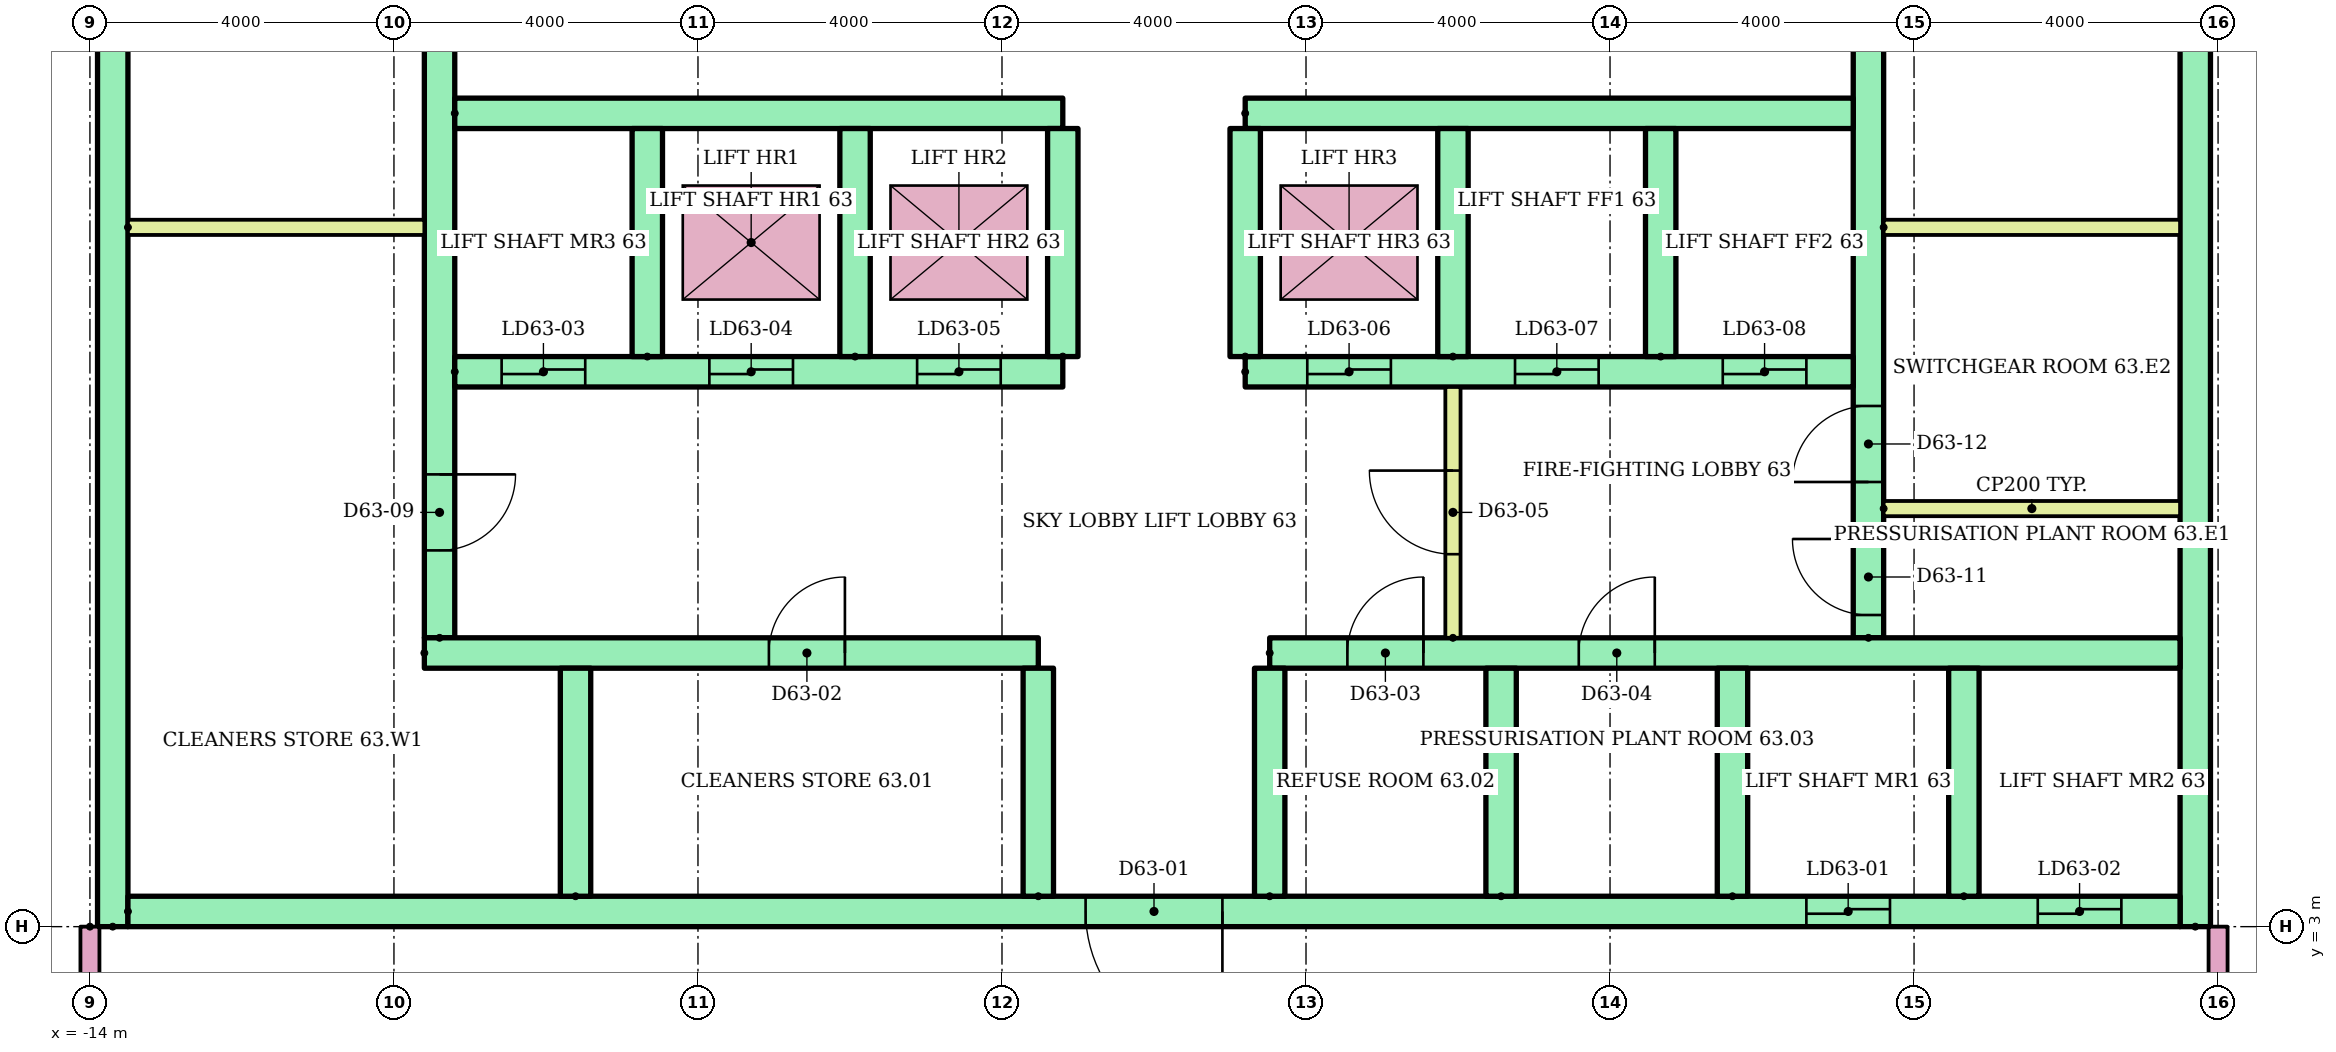
"""IFC4 building model, lengths in metres.
Left out: names, types, materials, properties, quantities, classifications, styles, units other than length and angle.
Written with IfcOpenShell. Run it as: python <this file> out.ifc"""

import sys

from ifc_helpers import new_model, si_unit, direction, frame, frame_2d, origin, place, context, subcontext, project, spatial, rectangle, extrude, element, fill, save


model = new_model("IFC4")
c1 = context("Model", 3, precision=1e-05, world=origin(), true_north=direction((0.0, 1.0)))
c2 = subcontext(c1, "Body", "Model", "MODEL_VIEW")
j1 = project(units=[si_unit("LENGTHUNIT", "METRE"), si_unit("PLANEANGLEUNIT", "RADIAN")], contexts=[c1])
p1 = place(None, origin())
s1 = spatial("IfcSite", under=j1, at=p1, CompositionType="ELEMENT")
p2 = place(p1, origin())
s2 = spatial("IfcBuilding", under=s1, at=p2, CompositionType="ELEMENT")
p3 = place(p2, frame((0.0, 0.0, 239.6)))
s3 = spatial("IfcBuildingStorey", under=s2, at=p3, CompositionType="ELEMENT", Elevation=239.6)
for number, where, z_axis, x_axis in (
    (1, (-13.7, 3.0, 0.0), (0.0, 0.0, 1.0), (0.0, 1.0, 0.0)),
    (2, (13.7, 3.0, 0.0), (0.0, 0.0, 1.0), (0.0, 1.0, 0.0)),
):
    element("IfcWall", number, at=place(p3, frame(where, z_axis=z_axis, x_axis=x_axis)), inside=s3, PredefinedType="SHEAR", context=c2, shape_type="SweptSolid", body=[
        extrude(rectangle(XDim=17.0, YDim=0.4, at=frame_2d((8.5, 0.0))), origin(), (0.0, 0.0, 1.0), 8.8),
    ])
p4 = place(p3, frame((-9.4, 6.8, 0.0), z_axis=(0.0, 0.0, 1.0), x_axis=(0.0, 1.0, 0.0)))
e3 = element("IfcWall", 3, at=p4, inside=s3, PredefinedType="SHEAR", context=c2, shape_type="SweptSolid", body=[
    extrude(rectangle(XDim=12.7, YDim=0.4, at=frame_2d((6.35, 0.0))), origin(), (0.0, 0.0, 1.0), 8.8),
])
p5 = place(p4, frame((1.15, 0.0, 0.0)))
e4 = element("IfcOpeningElement", 4, at=p5, cuts=e3, PredefinedType="OPENING", context=c2, shape_type="SweptSolid", body=[
    extrude(rectangle(XDim=1.0, YDim=2.1, at=frame_2d((0.5, 1.05))), frame((0.0, 0.21, 0.0), z_axis=(0.0, -1.0, 0.0), x_axis=(1.0, 0.0, 0.0)), (0.0, 0.0, 1.0), 0.42),
])
p6 = place(p4, frame((7.925, 0.0, 0.0)))
e5 = element("IfcOpeningElement", 5, at=p6, cuts=e3, PredefinedType="OPENING", context=c2, shape_type="SweptSolid", body=[
    extrude(rectangle(XDim=1.0, YDim=2.1, at=frame_2d((0.5, 1.05))), frame((0.0, 0.21, 0.0), z_axis=(0.0, -1.0, 0.0), x_axis=(1.0, 0.0, 0.0)), (0.0, 0.0, 1.0), 0.42),
])
p7 = place(p3, frame((9.4, 6.8, 0.0), z_axis=(0.0, 0.0, 1.0), x_axis=(0.0, 1.0, 0.0)))
e6 = element("IfcWall", 6, at=p7, inside=s3, PredefinedType="SHEAR", context=c2, shape_type="SweptSolid", body=[
    extrude(rectangle(XDim=12.7, YDim=0.4, at=frame_2d((6.35, 0.0))), origin(), (0.0, 0.0, 1.0), 8.8),
])
p8 = place(p7, frame((0.3, 0.0, 0.0)))
e7 = element("IfcOpeningElement", 7, at=p8, cuts=e6, PredefinedType="OPENING", context=c2, shape_type="SweptSolid", body=[
    extrude(rectangle(XDim=1.0, YDim=2.1, at=frame_2d((0.5, 1.05))), frame((0.0, 0.21, 0.0), z_axis=(0.0, -1.0, 0.0), x_axis=(1.0, 0.0, 0.0)), (0.0, 0.0, 1.0), 0.42),
])
p9 = place(p7, frame((2.05, 0.0, 0.0)))
e8 = element("IfcOpeningElement", 8, at=p9, cuts=e6, PredefinedType="OPENING", context=c2, shape_type="SweptSolid", body=[
    extrude(rectangle(XDim=1.0, YDim=2.1, at=frame_2d((0.5, 1.05))), frame((0.0, 0.21, 0.0), z_axis=(0.0, -1.0, 0.0), x_axis=(1.0, 0.0, 0.0)), (0.0, 0.0, 1.0), 0.42),
])
p10 = place(p7, frame((7.925, 0.0, 0.0)))
e9 = element("IfcOpeningElement", 9, at=p10, cuts=e6, PredefinedType="OPENING", context=c2, shape_type="SweptSolid", body=[
    extrude(rectangle(XDim=1.0, YDim=2.1, at=frame_2d((0.5, 1.05))), frame((0.0, 0.21, 0.0), z_axis=(0.0, -1.0, 0.0), x_axis=(1.0, 0.0, 0.0)), (0.0, 0.0, 1.0), 0.42),
])
p11 = place(p3, frame((-13.5, 3.2, 0.0)))
e10 = element("IfcWall", 10, at=p11, inside=s3, PredefinedType="SHEAR", context=c2, shape_type="SweptSolid", body=[
    extrude(rectangle(XDim=27.0, YDim=0.4, at=frame_2d((13.5, 0.0))), origin(), (0.0, 0.0, 1.0), 8.8),
])
p12 = place(p11, frame((22.083, 0.0, 0.0)))
e11 = element("IfcOpeningElement", 11, at=p12, cuts=e10, PredefinedType="OPENING", context=c2, shape_type="SweptSolid", body=[
    extrude(rectangle(XDim=1.1, YDim=2.1, at=frame_2d((0.55, 1.05))), frame((0.0, 0.21, 0.0), z_axis=(0.0, -1.0, 0.0), x_axis=(1.0, 0.0, 0.0)), (0.0, 0.0, 1.0), 0.42),
])
p13 = place(p11, frame((25.128, 0.0, 0.0)))
e12 = element("IfcOpeningElement", 12, at=p13, cuts=e10, PredefinedType="OPENING", context=c2, shape_type="SweptSolid", body=[
    extrude(rectangle(XDim=1.1, YDim=2.1, at=frame_2d((0.55, 1.05))), frame((0.0, 0.21, 0.0), z_axis=(0.0, -1.0, 0.0), x_axis=(1.0, 0.0, 0.0)), (0.0, 0.0, 1.0), 0.42),
])
p14 = place(p11, frame((12.6, 0.0, 0.0)))
e13 = element("IfcOpeningElement", 13, at=p14, cuts=e10, PredefinedType="OPENING", context=c2, shape_type="SweptSolid", body=[
    extrude(rectangle(XDim=1.8, YDim=2.1, at=frame_2d((0.9, 1.05))), frame((0.0, 0.21, 0.0), z_axis=(0.0, -1.0, 0.0), x_axis=(1.0, 0.0, 0.0)), (0.0, 0.0, 1.0), 0.42),
])
p15 = place(p3, frame((-9.6, 6.6, 0.0)))
e14 = element("IfcWall", 14, at=p15, inside=s3, PredefinedType="SHEAR", context=c2, shape_type="SweptSolid", body=[
    extrude(rectangle(XDim=8.078, YDim=0.4, at=frame_2d((4.039, 0.0))), origin(), (0.0, 0.0, 1.0), 8.8),
])
p16 = place(p15, frame((4.533, 0.0, 0.0)))
e15 = element("IfcOpeningElement", 15, at=p16, cuts=e14, PredefinedType="OPENING", context=c2, shape_type="SweptSolid", body=[
    extrude(rectangle(XDim=1.0, YDim=2.1, at=frame_2d((0.5, 1.05))), frame((0.0, 0.21, 0.0), z_axis=(0.0, -1.0, 0.0), x_axis=(1.0, 0.0, 0.0)), (0.0, 0.0, 1.0), 0.42),
])
p17 = place(p3, frame((1.522, 6.6, 0.0)))
e16 = element("IfcWall", 16, at=p17, inside=s3, PredefinedType="SHEAR", context=c2, shape_type="SweptSolid", body=[
    extrude(rectangle(XDim=11.978, YDim=0.4, at=frame_2d((5.989, 0.0))), origin(), (0.0, 0.0, 1.0), 8.8),
])
p18 = place(p17, frame((1.022, 0.0, 0.0)))
e17 = element("IfcOpeningElement", 17, at=p18, cuts=e16, PredefinedType="OPENING", context=c2, shape_type="SweptSolid", body=[
    extrude(rectangle(XDim=1.0, YDim=2.1, at=frame_2d((0.5, 1.05))), frame((0.0, 0.21, 0.0), z_axis=(0.0, -1.0, 0.0), x_axis=(1.0, 0.0, 0.0)), (0.0, 0.0, 1.0), 0.42),
])
p19 = place(p17, frame((4.067, 0.0, 0.0)))
e18 = element("IfcOpeningElement", 18, at=p19, cuts=e16, PredefinedType="OPENING", context=c2, shape_type="SweptSolid", body=[
    extrude(rectangle(XDim=1.0, YDim=2.1, at=frame_2d((0.5, 1.05))), frame((0.0, 0.21, 0.0), z_axis=(0.0, -1.0, 0.0), x_axis=(1.0, 0.0, 0.0)), (0.0, 0.0, 1.0), 0.42),
])
for number, where, z_axis, x_axis in (
    (19, (-7.611, 3.4, 0.0), (0.0, 0.0, 1.0), (0.0, 1.0, 0.0)),
    (20, (-1.522, 3.4, 0.0), (0.0, 0.0, 1.0), (0.0, 1.0, 0.0)),
    (21, (1.522, 3.4, 0.0), (0.0, 0.0, 1.0), (0.0, 1.0, 0.0)),
    (22, (4.567, 3.4, 0.0), (0.0, 0.0, 1.0), (0.0, 1.0, 0.0)),
    (23, (7.611, 3.4, 0.0), (0.0, 0.0, 1.0), (0.0, 1.0, 0.0)),
    (24, (10.656, 3.4, 0.0), (0.0, 0.0, 1.0), (0.0, 1.0, 0.0)),
):
    element("IfcWall", number, at=place(p3, frame(where, z_axis=z_axis, x_axis=x_axis)), inside=s3, PredefinedType="SHEAR", context=c2, shape_type="SweptSolid", body=[
        extrude(rectangle(XDim=3.0, YDim=0.4, at=frame_2d((1.5, 0.0))), origin(), (0.0, 0.0, 1.0), 8.8),
    ])
p20 = place(p3, frame((-9.2, 10.3, 0.0)))
e25 = element("IfcWall", 25, at=p20, inside=s3, PredefinedType="SHEAR", context=c2, shape_type="SweptSolid", body=[
    extrude(rectangle(XDim=8.0, YDim=0.4, at=frame_2d((4.0, 0.0))), origin(), (0.0, 0.0, 1.0), 8.8),
])
p21 = place(p20, frame((0.617, 0.0, 0.0)))
e26 = element("IfcOpeningElement", 26, at=p21, cuts=e25, PredefinedType="OPENING", context=c2, shape_type="SweptSolid", body=[
    extrude(rectangle(XDim=1.1, YDim=2.1, at=frame_2d((0.55, 1.05))), frame((0.0, 0.21, 0.0), z_axis=(0.0, -1.0, 0.0), x_axis=(1.0, 0.0, 0.0)), (0.0, 0.0, 1.0), 0.42),
])
p22 = place(p20, frame((3.35, 0.0, 0.0)))
e27 = element("IfcOpeningElement", 27, at=p22, cuts=e25, PredefinedType="OPENING", context=c2, shape_type="SweptSolid", body=[
    extrude(rectangle(XDim=1.1, YDim=2.1, at=frame_2d((0.55, 1.05))), frame((0.0, 0.21, 0.0), z_axis=(0.0, -1.0, 0.0), x_axis=(1.0, 0.0, 0.0)), (0.0, 0.0, 1.0), 0.42),
])
p23 = place(p20, frame((6.083, 0.0, 0.0)))
e28 = element("IfcOpeningElement", 28, at=p23, cuts=e25, PredefinedType="OPENING", context=c2, shape_type="SweptSolid", body=[
    extrude(rectangle(XDim=1.1, YDim=2.1, at=frame_2d((0.55, 1.05))), frame((0.0, 0.21, 0.0), z_axis=(0.0, -1.0, 0.0), x_axis=(1.0, 0.0, 0.0)), (0.0, 0.0, 1.0), 0.42),
])
p24 = place(p3, frame((-9.2, 13.7, 0.0)))
e29 = element("IfcWall", 29, at=p24, inside=s3, PredefinedType="SHEAR", context=c2, shape_type="SweptSolid", body=[
    extrude(rectangle(XDim=8.0, YDim=0.4, at=frame_2d((4.0, 0.0))), origin(), (0.0, 0.0, 1.0), 8.8),
])
p25 = place(p3, frame((1.2, 10.3, 0.0)))
e30 = element("IfcWall", 30, at=p25, inside=s3, PredefinedType="SHEAR", context=c2, shape_type="SweptSolid", body=[
    extrude(rectangle(XDim=8.0, YDim=0.4, at=frame_2d((4.0, 0.0))), origin(), (0.0, 0.0, 1.0), 8.8),
])
p26 = place(p25, frame((0.817, 0.0, 0.0)))
e31 = element("IfcOpeningElement", 31, at=p26, cuts=e30, PredefinedType="OPENING", context=c2, shape_type="SweptSolid", body=[
    extrude(rectangle(XDim=1.1, YDim=2.1, at=frame_2d((0.55, 1.05))), frame((0.0, 0.21, 0.0), z_axis=(0.0, -1.0, 0.0), x_axis=(1.0, 0.0, 0.0)), (0.0, 0.0, 1.0), 0.42),
])
p27 = place(p25, frame((3.55, 0.0, 0.0)))
e32 = element("IfcOpeningElement", 32, at=p27, cuts=e30, PredefinedType="OPENING", context=c2, shape_type="SweptSolid", body=[
    extrude(rectangle(XDim=1.1, YDim=2.1, at=frame_2d((0.55, 1.05))), frame((0.0, 0.21, 0.0), z_axis=(0.0, -1.0, 0.0), x_axis=(1.0, 0.0, 0.0)), (0.0, 0.0, 1.0), 0.42),
])
p28 = place(p25, frame((6.283, 0.0, 0.0)))
e33 = element("IfcOpeningElement", 33, at=p28, cuts=e30, PredefinedType="OPENING", context=c2, shape_type="SweptSolid", body=[
    extrude(rectangle(XDim=1.1, YDim=2.1, at=frame_2d((0.55, 1.05))), frame((0.0, 0.21, 0.0), z_axis=(0.0, -1.0, 0.0), x_axis=(1.0, 0.0, 0.0)), (0.0, 0.0, 1.0), 0.42),
])
p29 = place(p3, frame((1.2, 13.7, 0.0)))
e34 = element("IfcWall", 34, at=p29, inside=s3, PredefinedType="SHEAR", context=c2, shape_type="SweptSolid", body=[
    extrude(rectangle(XDim=8.0, YDim=0.4, at=frame_2d((4.0, 0.0))), origin(), (0.0, 0.0, 1.0), 8.8),
])
for number, where, z_axis, x_axis in (
    (35, (-6.667, 10.5, 0.0), (0.0, 0.0, 1.0), (0.0, 1.0, 0.0)),
    (36, (-3.933, 10.5, 0.0), (0.0, 0.0, 1.0), (0.0, 1.0, 0.0)),
    (37, (-1.2, 10.5, 0.0), (0.0, 0.0, 1.0), (0.0, 1.0, 0.0)),
    (38, (1.2, 10.5, 0.0), (0.0, 0.0, 1.0), (0.0, 1.0, 0.0)),
    (39, (3.933, 10.5, 0.0), (0.0, 0.0, 1.0), (0.0, 1.0, 0.0)),
    (40, (6.667, 10.5, 0.0), (0.0, 0.0, 1.0), (0.0, 1.0, 0.0)),
):
    element("IfcWall", number, at=place(p3, frame(where, z_axis=z_axis, x_axis=x_axis)), inside=s3, PredefinedType="SHEAR", context=c2, shape_type="SweptSolid", body=[
        extrude(rectangle(XDim=3.0, YDim=0.4, at=frame_2d((1.5, 0.0))), origin(), (0.0, 0.0, 1.0), 8.8),
    ])
p30 = place(p3, frame((3.933, 6.8, 0.0), z_axis=(0.0, 0.0, 1.0), x_axis=(0.0, 1.0, 0.0)))
e41 = element("IfcWall", 41, at=p30, inside=s3, PredefinedType="PARTITIONING", context=c2, shape_type="SweptSolid", body=[
    extrude(rectangle(XDim=3.3, YDim=0.2, at=frame_2d((1.65, 0.0))), origin(), (0.0, 0.0, 1.0), 8.8),
])
p31 = place(p30, frame((1.1, 0.0, 0.0)))
e42 = element("IfcOpeningElement", 42, at=p31, cuts=e41, PredefinedType="OPENING", context=c2, shape_type="SweptSolid", body=[
    extrude(rectangle(XDim=1.1, YDim=2.1, at=frame_2d((0.55, 1.05))), frame((0.0, 0.11, 0.0), z_axis=(0.0, -1.0, 0.0), x_axis=(1.0, 0.0, 0.0)), (0.0, 0.0, 1.0), 0.22),
])
for number, where in (
    (43, (-13.5, 12.2, 0.0)),
    (44, (9.6, 8.5, 0.0)),
    (45, (9.6, 12.2, 0.0)),
):
    element("IfcWall", number, at=place(p3, frame(where)), inside=s3, PredefinedType="PARTITIONING", context=c2, shape_type="SweptSolid", body=[
        extrude(rectangle(XDim=3.9, YDim=0.2, at=frame_2d((1.95, 0.0))), origin(), (0.0, 0.0, 1.0), 8.8),
    ])
for number, where, z_axis, x_axis in (
    (46, (-14.0, 3.0, 0.0), (0.0, 0.0, 1.0), (0.0, -1.0, 0.0)),
    (47, (14.0, 1.4, 0.0), (0.0, 0.0, 1.0), (0.0, 1.0, 0.0)),
):
    element("IfcWall", number, at=place(p3, frame(where, z_axis=z_axis, x_axis=x_axis)), inside=s3, PredefinedType="PARTITIONING", context=c2, shape_type="SweptSolid", body=[
        extrude(rectangle(XDim=1.6, YDim=0.25, at=frame_2d((0.8, 0.0))), origin(), (0.0, 0.0, 1.0), 8.8),
    ])
p32 = place(p12, origin())
e48 = element("IfcDoor", 48, at=p32, inside=s3, OperationType="SLIDING_TO_LEFT", PredefinedType="DOOR", context=c2, shape_type="SweptSolid", body=[
    extrude(rectangle(XDim=1.1, YDim=2.1, at=frame_2d((0.55, 1.05))), frame((0.0, 0.025, 0.0), z_axis=(0.0, -1.0, 0.0), x_axis=(1.0, 0.0, 0.0)), (0.0, 0.0, 1.0), 0.05),
])
fill(e11, e48)
p33 = place(p13, origin())
e49 = element("IfcDoor", 49, at=p33, inside=s3, OperationType="SLIDING_TO_LEFT", PredefinedType="DOOR", context=c2, shape_type="SweptSolid", body=[
    extrude(rectangle(XDim=1.1, YDim=2.1, at=frame_2d((0.55, 1.05))), frame((0.0, 0.025, 0.0), z_axis=(0.0, -1.0, 0.0), x_axis=(1.0, 0.0, 0.0)), (0.0, 0.0, 1.0), 0.05),
])
fill(e12, e49)
p34 = place(p14, frame((1.8, 0.0, 0.0), z_axis=(0.0, 0.0, 1.0), x_axis=(-1.0, 0.0, 0.0)))
e50 = element("IfcDoor", 50, at=p34, inside=s3, OperationType="DOUBLE_DOOR_SINGLE_SWING", PredefinedType="DOOR", context=c2, shape_type="SweptSolid", body=[
    extrude(rectangle(XDim=1.8, YDim=2.1, at=frame_2d((0.9, 1.05))), frame((0.0, 0.025, 0.0), z_axis=(0.0, -1.0, 0.0), x_axis=(1.0, 0.0, 0.0)), (0.0, 0.0, 1.0), 0.05),
])
fill(e13, e50)
p35 = place(p16, origin())
e51 = element("IfcDoor", 51, at=p35, inside=s3, OperationType="SINGLE_SWING_RIGHT", PredefinedType="DOOR", context=c2, shape_type="SweptSolid", body=[
    extrude(rectangle(XDim=1.0, YDim=2.1, at=frame_2d((0.5, 1.05))), frame((0.0, 0.025, 0.0), z_axis=(0.0, -1.0, 0.0), x_axis=(1.0, 0.0, 0.0)), (0.0, 0.0, 1.0), 0.05),
])
fill(e15, e51)
p36 = place(p18, origin())
e52 = element("IfcDoor", 52, at=p36, inside=s3, OperationType="SINGLE_SWING_RIGHT", PredefinedType="DOOR", context=c2, shape_type="SweptSolid", body=[
    extrude(rectangle(XDim=1.0, YDim=2.1, at=frame_2d((0.5, 1.05))), frame((0.0, 0.025, 0.0), z_axis=(0.0, -1.0, 0.0), x_axis=(1.0, 0.0, 0.0)), (0.0, 0.0, 1.0), 0.05),
])
fill(e17, e52)
p37 = place(p19, origin())
e53 = element("IfcDoor", 53, at=p37, inside=s3, OperationType="SINGLE_SWING_RIGHT", PredefinedType="DOOR", context=c2, shape_type="SweptSolid", body=[
    extrude(rectangle(XDim=1.0, YDim=2.1, at=frame_2d((0.5, 1.05))), frame((0.0, 0.025, 0.0), z_axis=(0.0, -1.0, 0.0), x_axis=(1.0, 0.0, 0.0)), (0.0, 0.0, 1.0), 0.05),
])
fill(e18, e53)
p38 = place(p21, origin())
e54 = element("IfcDoor", 54, at=p38, inside=s3, OperationType="SLIDING_TO_LEFT", PredefinedType="DOOR", context=c2, shape_type="SweptSolid", body=[
    extrude(rectangle(XDim=1.1, YDim=2.1, at=frame_2d((0.55, 1.05))), frame((0.0, 0.025, 0.0), z_axis=(0.0, -1.0, 0.0), x_axis=(1.0, 0.0, 0.0)), (0.0, 0.0, 1.0), 0.05),
])
fill(e26, e54)
p39 = place(p22, origin())
e55 = element("IfcDoor", 55, at=p39, inside=s3, OperationType="SLIDING_TO_LEFT", PredefinedType="DOOR", context=c2, shape_type="SweptSolid", body=[
    extrude(rectangle(XDim=1.1, YDim=2.1, at=frame_2d((0.55, 1.05))), frame((0.0, 0.025, 0.0), z_axis=(0.0, -1.0, 0.0), x_axis=(1.0, 0.0, 0.0)), (0.0, 0.0, 1.0), 0.05),
])
fill(e27, e55)
p40 = place(p23, origin())
e56 = element("IfcDoor", 56, at=p40, inside=s3, OperationType="SLIDING_TO_LEFT", PredefinedType="DOOR", context=c2, shape_type="SweptSolid", body=[
    extrude(rectangle(XDim=1.1, YDim=2.1, at=frame_2d((0.55, 1.05))), frame((0.0, 0.025, 0.0), z_axis=(0.0, -1.0, 0.0), x_axis=(1.0, 0.0, 0.0)), (0.0, 0.0, 1.0), 0.05),
])
fill(e28, e56)
p41 = place(p26, origin())
e57 = element("IfcDoor", 57, at=p41, inside=s3, OperationType="SLIDING_TO_LEFT", PredefinedType="DOOR", context=c2, shape_type="SweptSolid", body=[
    extrude(rectangle(XDim=1.1, YDim=2.1, at=frame_2d((0.55, 1.05))), frame((0.0, 0.025, 0.0), z_axis=(0.0, -1.0, 0.0), x_axis=(1.0, 0.0, 0.0)), (0.0, 0.0, 1.0), 0.05),
])
fill(e31, e57)
p42 = place(p27, origin())
e58 = element("IfcDoor", 58, at=p42, inside=s3, OperationType="SLIDING_TO_LEFT", PredefinedType="DOOR", context=c2, shape_type="SweptSolid", body=[
    extrude(rectangle(XDim=1.1, YDim=2.1, at=frame_2d((0.55, 1.05))), frame((0.0, 0.025, 0.0), z_axis=(0.0, -1.0, 0.0), x_axis=(1.0, 0.0, 0.0)), (0.0, 0.0, 1.0), 0.05),
])
fill(e32, e58)
p43 = place(p28, origin())
e59 = element("IfcDoor", 59, at=p43, inside=s3, OperationType="SLIDING_TO_LEFT", PredefinedType="DOOR", context=c2, shape_type="SweptSolid", body=[
    extrude(rectangle(XDim=1.1, YDim=2.1, at=frame_2d((0.55, 1.05))), frame((0.0, 0.025, 0.0), z_axis=(0.0, -1.0, 0.0), x_axis=(1.0, 0.0, 0.0)), (0.0, 0.0, 1.0), 0.05),
])
fill(e33, e59)
p44 = place(p31, origin())
e60 = element("IfcDoor", 60, at=p44, inside=s3, OperationType="SINGLE_SWING_RIGHT", PredefinedType="DOOR", context=c2, shape_type="SweptSolid", body=[
    extrude(rectangle(XDim=1.1, YDim=2.1, at=frame_2d((0.55, 1.05))), frame((0.0, 0.025, 0.0), z_axis=(0.0, -1.0, 0.0), x_axis=(1.0, 0.0, 0.0)), (0.0, 0.0, 1.0), 0.05),
])
fill(e42, e60)
p45 = place(p5, frame((1.0, 0.0, 0.0), z_axis=(0.0, 0.0, 1.0), x_axis=(-1.0, 0.0, 0.0)))
e61 = element("IfcDoor", 61, at=p45, inside=s3, OperationType="SINGLE_SWING_RIGHT", PredefinedType="DOOR", context=c2, shape_type="SweptSolid", body=[
    extrude(rectangle(XDim=1.0, YDim=2.1, at=frame_2d((0.5, 1.05))), frame((0.0, 0.025, 0.0), z_axis=(0.0, -1.0, 0.0), x_axis=(1.0, 0.0, 0.0)), (0.0, 0.0, 1.0), 0.05),
])
fill(e4, e61)
p46 = place(p8, origin())
e62 = element("IfcDoor", 62, at=p46, inside=s3, OperationType="SINGLE_SWING_RIGHT", PredefinedType="DOOR", context=c2, shape_type="SweptSolid", body=[
    extrude(rectangle(XDim=1.0, YDim=2.1, at=frame_2d((0.5, 1.05))), frame((0.0, 0.025, 0.0), z_axis=(0.0, -1.0, 0.0), x_axis=(1.0, 0.0, 0.0)), (0.0, 0.0, 1.0), 0.05),
])
fill(e7, e62)
p47 = place(p9, origin())
e63 = element("IfcDoor", 63, at=p47, inside=s3, OperationType="SINGLE_SWING_LEFT", PredefinedType="DOOR", context=c2, shape_type="SweptSolid", body=[
    extrude(rectangle(XDim=1.0, YDim=2.1, at=frame_2d((0.5, 1.05))), frame((0.0, 0.025, 0.0), z_axis=(0.0, -1.0, 0.0), x_axis=(1.0, 0.0, 0.0)), (0.0, 0.0, 1.0), 0.05),
])
fill(e8, e63)
save(model, sys.argv[1])
